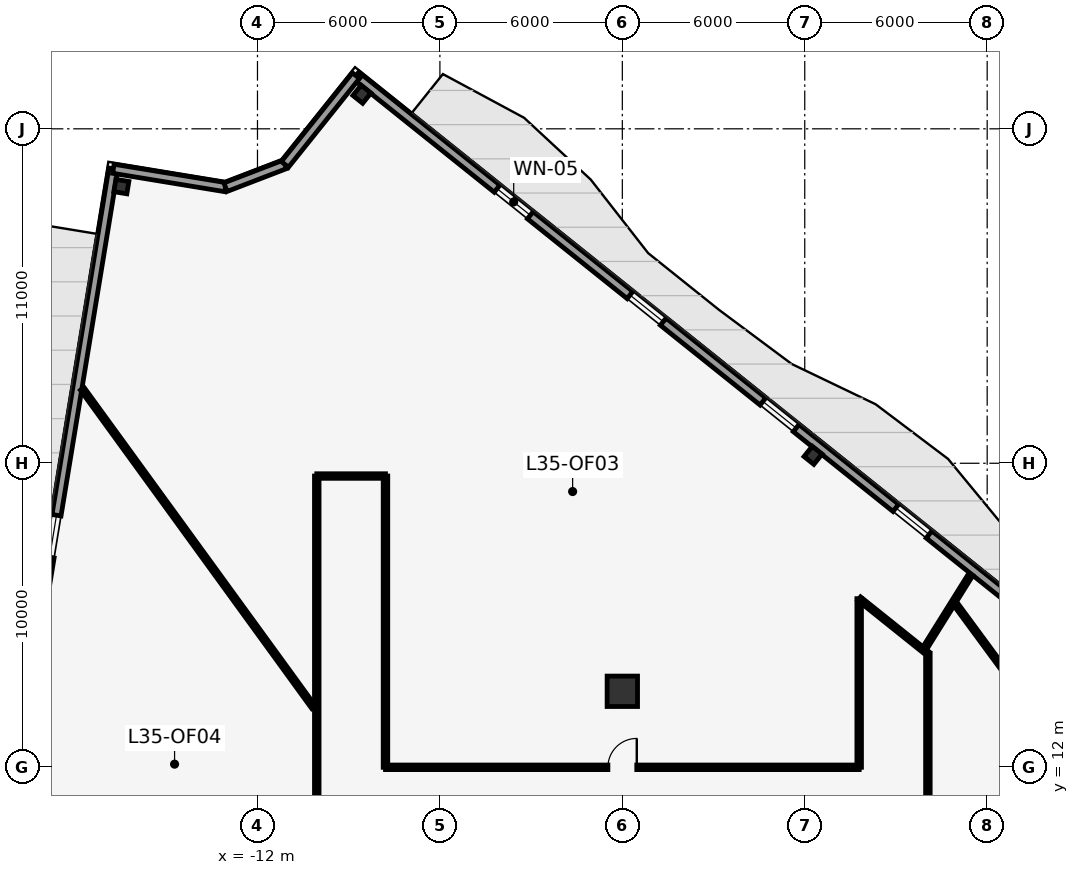
"""IFC4 building model, lengths in metres.
Left out: names, types, materials, properties, quantities, classifications, styles, units other than length and angle.
Written with IfcOpenShell. Run it as: python <this file> out.ifc"""

import sys

from ifc_helpers import new_model, si_unit, direction, frame, frame_2d, origin, origin_2d, place, context, subcontext, project, spatial, rectangle, i_section, extrude, element, fill, save


model = new_model("IFC4")
c1 = context("Model", 3, precision=1e-05, world=origin(), true_north=direction((0.0, 1.0)))
c2 = subcontext(c1, "Body", "Model", "MODEL_VIEW")
j1 = project(units=[si_unit("LENGTHUNIT", "METRE"), si_unit("PLANEANGLEUNIT", "RADIAN")], contexts=[c1])
p1 = place(None, origin())
s1 = spatial("IfcSite", under=j1, at=p1, CompositionType="ELEMENT")
p2 = place(p1, origin())
s2 = spatial("IfcBuilding", under=s1, at=p2, CompositionType="ELEMENT")
p3 = place(p2, frame((0.0, 0.0, 152.7)))
s3 = spatial("IfcBuildingStorey", under=s2, at=p3, CompositionType="ELEMENT", Elevation=152.7)
p4 = place(p3, frame((0.0, 14.5, 0.0), z_axis=(0.0, 0.0, 1.0), x_axis=(1.0, 0.0, 0.0)))
e1 = element("IfcColumn", 1, at=p4, inside=s3, PredefinedType="COLUMN", context=c2, shape_type="SweptSolid", body=[
    extrude(rectangle(XDim=1.0, YDim=1.0, at=origin_2d()), origin(), (0.0, 0.0, 1.0), 4.1),
])
for number, where, z_axis, x_axis in (
    (2, (-16.477, 31.1, 0.0), (0.0, 0.0, 1.0), (0.162, 0.987, 0.0)),
    (3, (6.273, 22.262, 0.0), (0.0, 0.0, 1.0), (-0.781, 0.625, 0.0)),
    (4, (-8.565, 34.138, 0.0), (0.0, 0.0, 1.0), (-0.781, 0.625, 0.0)),
):
    element("IfcColumn", number, at=place(p3, frame(where, z_axis=z_axis, x_axis=x_axis)), inside=s3, PredefinedType="COLUMN", context=c2, shape_type="SweptSolid", body=[
        extrude(i_section(OverallWidth=0.411, OverallDepth=0.434, WebThickness=0.036, FlangeThickness=0.057, at=origin_2d()), origin(), (0.0, 0.0, 1.0), 4.1),
    ])
p5 = place(p3, frame((-8.762, 34.748, 0.0), z_axis=(0.0, 0.0, 1.0), x_axis=(0.780669916438, -0.624943582708, 0.0)))
e5 = element("IfcWall", 5, at=p5, inside=s3, PredefinedType="STANDARD", context=c2, shape_type="SweptSolid", body=[
    extrude(rectangle(XDim=58.093, YDim=0.3, at=frame_2d((29.046, 0.0))), origin(), (0.0, 0.0, 1.0), 3.85),
])
p6 = place(p5, frame((28.547, 0.0, 0.0)))
e6 = element("IfcOpeningElement", 6, at=p6, cuts=e5, PredefinedType="OPENING", context=c2, shape_type="SweptSolid", body=[
    extrude(rectangle(XDim=1.0, YDim=2.15, at=frame_2d((0.5, 1.075))), frame((0.0, 0.16, 0.0), z_axis=(0.0, -1.0, 0.0), x_axis=(1.0, 0.0, 0.0)), (0.0, 0.0, 1.0), 0.32),
])
p7 = place(p5, frame((5.947, 0.0, 0.85)))
e7 = element("IfcOpeningElement", 7, at=p7, cuts=e5, PredefinedType="OPENING", context=c2, shape_type="SweptSolid", body=[
    extrude(rectangle(XDim=1.4, YDim=2.2, at=frame_2d((0.7, 1.1))), frame((0.0, 0.16, 0.0), z_axis=(0.0, -1.0, 0.0), x_axis=(1.0, 0.0, 0.0)), (0.0, 0.0, 1.0), 0.32),
])
p8 = place(p5, frame((11.547, 0.0, 0.85)))
e8 = element("IfcOpeningElement", 8, at=p8, cuts=e5, PredefinedType="OPENING", context=c2, shape_type="SweptSolid", body=[
    extrude(rectangle(XDim=1.4, YDim=2.2, at=frame_2d((0.7, 1.1))), frame((0.0, 0.16, 0.0), z_axis=(0.0, -1.0, 0.0), x_axis=(1.0, 0.0, 0.0)), (0.0, 0.0, 1.0), 0.32),
])
p9 = place(p5, frame((17.146, 0.0, 0.85)))
e9 = element("IfcOpeningElement", 9, at=p9, cuts=e5, PredefinedType="OPENING", context=c2, shape_type="SweptSolid", body=[
    extrude(rectangle(XDim=1.4, YDim=2.2, at=frame_2d((0.7, 1.1))), frame((0.0, 0.16, 0.0), z_axis=(0.0, -1.0, 0.0), x_axis=(1.0, 0.0, 0.0)), (0.0, 0.0, 1.0), 0.32),
])
p10 = place(p5, frame((22.747, 0.0, 0.85)))
e10 = element("IfcOpeningElement", 10, at=p10, cuts=e5, PredefinedType="OPENING", context=c2, shape_type="SweptSolid", body=[
    extrude(rectangle(XDim=1.4, YDim=2.2, at=frame_2d((0.7, 1.1))), frame((0.0, 0.16, 0.0), z_axis=(0.0, -1.0, 0.0), x_axis=(1.0, 0.0, 0.0)), (0.0, 0.0, 1.0), 0.32),
])
p11 = place(p5, frame((33.947, 0.0, 0.85)))
e11 = element("IfcOpeningElement", 11, at=p11, cuts=e5, PredefinedType="OPENING", context=c2, shape_type="SweptSolid", body=[
    extrude(rectangle(XDim=1.4, YDim=2.2, at=frame_2d((0.7, 1.1))), frame((0.0, 0.16, 0.0), z_axis=(0.0, -1.0, 0.0), x_axis=(1.0, 0.0, 0.0)), (0.0, 0.0, 1.0), 0.32),
])
p12 = place(p5, frame((39.547, 0.0, 0.85)))
e12 = element("IfcOpeningElement", 12, at=p12, cuts=e5, PredefinedType="OPENING", context=c2, shape_type="SweptSolid", body=[
    extrude(rectangle(XDim=1.4, YDim=2.2, at=frame_2d((0.7, 1.1))), frame((0.0, 0.16, 0.0), z_axis=(0.0, -1.0, 0.0), x_axis=(1.0, 0.0, 0.0)), (0.0, 0.0, 1.0), 0.32),
])
p13 = place(p5, frame((45.146, 0.0, 0.85)))
e13 = element("IfcOpeningElement", 13, at=p13, cuts=e5, PredefinedType="OPENING", context=c2, shape_type="SweptSolid", body=[
    extrude(rectangle(XDim=1.4, YDim=2.2, at=frame_2d((0.7, 1.1))), frame((0.0, 0.16, 0.0), z_axis=(0.0, -1.0, 0.0), x_axis=(1.0, 0.0, 0.0)), (0.0, 0.0, 1.0), 0.32),
])
p14 = place(p5, frame((50.747, 0.0, 0.85)))
e14 = element("IfcOpeningElement", 14, at=p14, cuts=e5, PredefinedType="OPENING", context=c2, shape_type="SweptSolid", body=[
    extrude(rectangle(XDim=1.4, YDim=2.2, at=frame_2d((0.7, 1.1))), frame((0.0, 0.16, 0.0), z_axis=(0.0, -1.0, 0.0), x_axis=(1.0, 0.0, 0.0)), (0.0, 0.0, 1.0), 0.32),
])
p15 = place(p3, frame((-26.15, -25.64, 0.0), z_axis=(0.0, 0.0, 1.0), x_axis=(0.161975761987, 0.986794736776, 0.0)))
e15 = element("IfcWall", 15, at=p15, inside=s3, PredefinedType="STANDARD", context=c2, shape_type="SweptSolid", body=[
    extrude(rectangle(XDim=58.093, YDim=0.3, at=frame_2d((29.046, 0.0))), origin(), (0.0, 0.0, 1.0), 3.85),
])
p16 = place(p15, frame((28.546, 0.0, 0.0)))
e16 = element("IfcOpeningElement", 16, at=p16, cuts=e15, PredefinedType="OPENING", context=c2, shape_type="SweptSolid", body=[
    extrude(rectangle(XDim=1.0, YDim=2.15, at=frame_2d((0.5, 1.075))), frame((0.0, 0.16, 0.0), z_axis=(0.0, -1.0, 0.0), x_axis=(1.0, 0.0, 0.0)), (0.0, 0.0, 1.0), 0.32),
])
p17 = place(p15, frame((5.947, 0.0, 0.85)))
e17 = element("IfcOpeningElement", 17, at=p17, cuts=e15, PredefinedType="OPENING", context=c2, shape_type="SweptSolid", body=[
    extrude(rectangle(XDim=1.4, YDim=2.2, at=frame_2d((0.7, 1.1))), frame((0.0, 0.16, 0.0), z_axis=(0.0, -1.0, 0.0), x_axis=(1.0, 0.0, 0.0)), (0.0, 0.0, 1.0), 0.32),
])
p18 = place(p15, frame((11.546, 0.0, 0.85)))
e18 = element("IfcOpeningElement", 18, at=p18, cuts=e15, PredefinedType="OPENING", context=c2, shape_type="SweptSolid", body=[
    extrude(rectangle(XDim=1.4, YDim=2.2, at=frame_2d((0.7, 1.1))), frame((0.0, 0.16, 0.0), z_axis=(0.0, -1.0, 0.0), x_axis=(1.0, 0.0, 0.0)), (0.0, 0.0, 1.0), 0.32),
])
p19 = place(p15, frame((22.747, 0.0, 0.85)))
e19 = element("IfcOpeningElement", 19, at=p19, cuts=e15, PredefinedType="OPENING", context=c2, shape_type="SweptSolid", body=[
    extrude(rectangle(XDim=1.4, YDim=2.2, at=frame_2d((0.7, 1.1))), frame((0.0, 0.16, 0.0), z_axis=(0.0, -1.0, 0.0), x_axis=(1.0, 0.0, 0.0)), (0.0, 0.0, 1.0), 0.32),
])
p20 = place(p15, frame((33.947, 0.0, 0.85)))
e20 = element("IfcOpeningElement", 20, at=p20, cuts=e15, PredefinedType="OPENING", context=c2, shape_type="SweptSolid", body=[
    extrude(rectangle(XDim=1.4, YDim=2.2, at=frame_2d((0.7, 1.1))), frame((0.0, 0.16, 0.0), z_axis=(0.0, -1.0, 0.0), x_axis=(1.0, 0.0, 0.0)), (0.0, 0.0, 1.0), 0.32),
])
p21 = place(p15, frame((39.546, 0.0, 0.85)))
e21 = element("IfcOpeningElement", 21, at=p21, cuts=e15, PredefinedType="OPENING", context=c2, shape_type="SweptSolid", body=[
    extrude(rectangle(XDim=1.4, YDim=2.2, at=frame_2d((0.7, 1.1))), frame((0.0, 0.16, 0.0), z_axis=(0.0, -1.0, 0.0), x_axis=(1.0, 0.0, 0.0)), (0.0, 0.0, 1.0), 0.32),
])
p22 = place(p15, frame((45.146, 0.0, 0.85)))
e22 = element("IfcOpeningElement", 22, at=p22, cuts=e15, PredefinedType="OPENING", context=c2, shape_type="SweptSolid", body=[
    extrude(rectangle(XDim=1.4, YDim=2.2, at=frame_2d((0.7, 1.1))), frame((0.0, 0.16, 0.0), z_axis=(0.0, -1.0, 0.0), x_axis=(1.0, 0.0, 0.0)), (0.0, 0.0, 1.0), 0.32),
])
p23 = place(p3, frame((-16.74, 31.686, 0.0), z_axis=(0.0, 0.0, 1.0), x_axis=(0.986793455184, -0.161983569556, 0.0)))
e23 = element("IfcWall", 23, at=p23, inside=s3, PredefinedType="STANDARD", context=c2, shape_type="SweptSolid", body=[
    extrude(rectangle(XDim=3.738, YDim=0.3, at=frame_2d((1.869, 0.0))), origin(), (0.0, 0.0, 1.0), 3.85),
])
p24 = place(p3, frame((-13.052, 31.08, 0.0), z_axis=(0.0, 0.0, 1.0), x_axis=(0.933582919313, 0.35836145547, 0.0)))
e24 = element("IfcWall", 24, at=p24, inside=s3, PredefinedType="STANDARD", context=c2, shape_type="SweptSolid", body=[
    extrude(rectangle(XDim=2.093, YDim=0.3, at=frame_2d((1.046, 0.0))), origin(), (0.0, 0.0, 1.0), 3.85),
])
p25 = place(p3, frame((-11.098, 31.83, 0.0), z_axis=(0.0, 0.0, 1.0), x_axis=(0.624949908599, 0.78066485238, 0.0)))
e25 = element("IfcWall", 25, at=p25, inside=s3, PredefinedType="STANDARD", context=c2, shape_type="SweptSolid", body=[
    extrude(rectangle(XDim=3.738, YDim=0.3, at=frame_2d((1.869, 0.0))), origin(), (0.0, 0.0, 1.0), 3.85),
])
p26 = place(p3, frame((-10.05, 0.13, 0.0), z_axis=(0.0, 0.0, 1.0), x_axis=(0.0, 1.0, 0.0)))
e26 = element("IfcWall", 26, at=p26, inside=s3, PredefinedType="PARTITIONING", context=c2, shape_type="SweptSolid", body=[
    extrude(rectangle(XDim=21.45, YDim=0.15, at=frame_2d((10.725, 0.0))), origin(), (0.0, 0.0, 1.0), 3.85),
])
p27 = place(p26, frame((6.601, 0.0, 0.0)))
e27 = element("IfcOpeningElement", 27, at=p27, cuts=e26, PredefinedType="OPENING", context=c2, shape_type="SweptSolid", body=[
    extrude(rectangle(XDim=0.95, YDim=2.15, at=frame_2d((0.475, 1.075))), frame((0.0, 0.085, 0.0), z_axis=(0.0, -1.0, 0.0), x_axis=(1.0, 0.0, 0.0)), (0.0, 0.0, 1.0), 0.17),
])
p28 = place(p3, frame((-10.05, 21.58, 0.0), z_axis=(0.0, 0.0, 1.0), x_axis=(1.0, 0.0, 0.0)))
e28 = element("IfcWall", 28, at=p28, inside=s3, PredefinedType="PARTITIONING", context=c2, shape_type="SweptSolid", body=[
    extrude(rectangle(XDim=2.26, YDim=0.15, at=frame_2d((1.13, 0.0))), origin(), (0.0, 0.0, 1.0), 3.85),
])
p29 = place(p3, frame((-7.79, 21.58, 0.0), z_axis=(0.0, 0.0, 1.0), x_axis=(0.0, -1.0, 0.0)))
e29 = element("IfcWall", 29, at=p29, inside=s3, PredefinedType="PARTITIONING", context=c2, shape_type="SweptSolid", body=[
    extrude(rectangle(XDim=9.58, YDim=0.15, at=frame_2d((4.79, 0.0))), origin(), (0.0, 0.0, 1.0), 3.85),
])
p30 = place(p3, frame((-7.79, 12.0, 0.0), z_axis=(0.0, 0.0, 1.0), x_axis=(1.0, 0.0, 0.0)))
e30 = element("IfcWall", 30, at=p30, inside=s3, PredefinedType="PARTITIONING", context=c2, shape_type="SweptSolid", body=[
    extrude(rectangle(XDim=15.58, YDim=0.15, at=frame_2d((7.79, 0.0))), origin(), (0.0, 0.0, 1.0), 3.85),
])
p31 = place(p30, frame((7.315, 0.0, 0.0)))
e31 = element("IfcOpeningElement", 31, at=p31, cuts=e30, PredefinedType="OPENING", context=c2, shape_type="SweptSolid", body=[
    extrude(rectangle(XDim=0.95, YDim=2.15, at=frame_2d((0.475, 1.075))), frame((0.0, 0.085, 0.0), z_axis=(0.0, -1.0, 0.0), x_axis=(1.0, 0.0, 0.0)), (0.0, 0.0, 1.0), 0.17),
])
p32 = place(p3, frame((7.79, 12.0, 0.0), z_axis=(0.0, 0.0, 1.0), x_axis=(0.0, 1.0, 0.0)))
e32 = element("IfcWall", 32, at=p32, inside=s3, PredefinedType="PARTITIONING", context=c2, shape_type="SweptSolid", body=[
    extrude(rectangle(XDim=5.547, YDim=0.15, at=frame_2d((2.773, 0.0))), origin(), (0.0, 0.0, 1.0), 3.85),
])
p33 = place(p3, frame((7.79, 17.547, 0.0), z_axis=(0.0, 0.0, 1.0), x_axis=(0.780646621428, -0.624972681366, 0.0)))
e33 = element("IfcWall", 33, at=p33, inside=s3, PredefinedType="PARTITIONING", context=c2, shape_type="SweptSolid", body=[
    extrude(rectangle(XDim=2.895, YDim=0.15, at=frame_2d((1.448, 0.0))), origin(), (0.0, 0.0, 1.0), 3.85),
])
p34 = place(p3, frame((10.05, 15.737, 0.0), z_axis=(0.0, 0.0, 1.0), x_axis=(0.0, -1.0, 0.0)))
e34 = element("IfcWall", 34, at=p34, inside=s3, PredefinedType="PARTITIONING", context=c2, shape_type="SweptSolid", body=[
    extrude(rectangle(XDim=15.607, YDim=0.15, at=frame_2d((7.804, 0.0))), origin(), (0.0, 0.0, 1.0), 3.85),
])
p35 = place(p34, frame((7.329, 0.0, 0.0)))
e35 = element("IfcOpeningElement", 35, at=p35, cuts=e34, PredefinedType="OPENING", context=c2, shape_type="SweptSolid", body=[
    extrude(rectangle(XDim=0.95, YDim=2.15, at=frame_2d((0.475, 1.075))), frame((0.0, 0.085, 0.0), z_axis=(0.0, -1.0, 0.0), x_axis=(1.0, 0.0, 0.0)), (0.0, 0.0, 1.0), 0.17),
])
p36 = place(p3, frame((9.962, 15.942, 0.0), z_axis=(0.0, 0.0, 1.0), x_axis=(0.529929252451, 0.848041854743, 0.0)))
e36 = element("IfcWall", 36, at=p36, inside=s3, PredefinedType="PARTITIONING", context=c2, shape_type="SweptSolid", body=[
    extrude(rectangle(XDim=2.834, YDim=0.15, at=frame_2d((1.417, 0.0))), origin(), (0.0, 0.0, 1.0), 3.85),
])
p37 = place(p3, frame((-10.155, 13.977, 0.0), z_axis=(0.0, 0.0, 1.0), x_axis=(-0.587795827483, 0.809009310944, 0.0)))
e37 = element("IfcWall", 37, at=p37, inside=s3, PredefinedType="PARTITIONING", context=c2, shape_type="SweptSolid", body=[
    extrude(rectangle(XDim=12.94, YDim=0.15, at=frame_2d((6.47, 0.0))), origin(), (0.0, 0.0, 1.0), 3.85),
])
p38 = place(p3, frame((28.13, -5.954, 0.0), z_axis=(0.0, 0.0, 1.0), x_axis=(-0.592900374234, 0.805275819973, 0.0)))
e38 = element("IfcWall", 38, at=p38, inside=s3, PredefinedType="PARTITIONING", context=c2, shape_type="SweptSolid", body=[
    extrude(rectangle(XDim=29.031, YDim=0.15, at=frame_2d((14.516, 0.0))), origin(), (0.0, 0.0, 1.0), 3.85),
])
p39 = place(p38, frame((14.066, 0.0, 0.0)))
e39 = element("IfcOpeningElement", 39, at=p39, cuts=e38, PredefinedType="OPENING", context=c2, shape_type="SweptSolid", body=[
    extrude(rectangle(XDim=0.9, YDim=2.1, at=frame_2d((0.45, 1.05))), frame((0.0, 0.085, 0.0), z_axis=(0.0, -1.0, 0.0), x_axis=(1.0, 0.0, 0.0)), (0.0, 0.0, 1.0), 0.17),
])
p40 = place(p7, origin())
e40 = element("IfcWindow", 40, at=p40, inside=s3, PartitioningType="SINGLE_PANEL", PredefinedType="WINDOW", context=c2, shape_type="SweptSolid", body=[
    extrude(rectangle(XDim=1.4, YDim=2.2, at=frame_2d((0.7, 1.1))), frame((0.0, 0.03, 0.0), z_axis=(0.0, -1.0, 0.0), x_axis=(1.0, 0.0, 0.0)), (0.0, 0.0, 1.0), 0.06),
])
fill(e7, e40)
p41 = place(p8, origin())
e41 = element("IfcWindow", 41, at=p41, inside=s3, PartitioningType="SINGLE_PANEL", PredefinedType="WINDOW", context=c2, shape_type="SweptSolid", body=[
    extrude(rectangle(XDim=1.4, YDim=2.2, at=frame_2d((0.7, 1.1))), frame((0.0, 0.03, 0.0), z_axis=(0.0, -1.0, 0.0), x_axis=(1.0, 0.0, 0.0)), (0.0, 0.0, 1.0), 0.06),
])
fill(e8, e41)
p42 = place(p9, origin())
e42 = element("IfcWindow", 42, at=p42, inside=s3, PartitioningType="SINGLE_PANEL", PredefinedType="WINDOW", context=c2, shape_type="SweptSolid", body=[
    extrude(rectangle(XDim=1.4, YDim=2.2, at=frame_2d((0.7, 1.1))), frame((0.0, 0.03, 0.0), z_axis=(0.0, -1.0, 0.0), x_axis=(1.0, 0.0, 0.0)), (0.0, 0.0, 1.0), 0.06),
])
fill(e9, e42)
p43 = place(p10, origin())
e43 = element("IfcWindow", 43, at=p43, inside=s3, PartitioningType="SINGLE_PANEL", PredefinedType="WINDOW", context=c2, shape_type="SweptSolid", body=[
    extrude(rectangle(XDim=1.4, YDim=2.2, at=frame_2d((0.7, 1.1))), frame((0.0, 0.03, 0.0), z_axis=(0.0, -1.0, 0.0), x_axis=(1.0, 0.0, 0.0)), (0.0, 0.0, 1.0), 0.06),
])
fill(e10, e43)
p44 = place(p22, origin())
e44 = element("IfcWindow", 44, at=p44, inside=s3, PartitioningType="SINGLE_PANEL", PredefinedType="WINDOW", context=c2, shape_type="SweptSolid", body=[
    extrude(rectangle(XDim=1.4, YDim=2.2, at=frame_2d((0.7, 1.1))), frame((0.0, 0.03, 0.0), z_axis=(0.0, -1.0, 0.0), x_axis=(1.0, 0.0, 0.0)), (0.0, 0.0, 1.0), 0.06),
])
fill(e22, e44)
p45 = place(p31, origin())
e45 = element("IfcDoor", 45, at=p45, inside=s3, OperationType="SINGLE_SWING_RIGHT", PredefinedType="DOOR", context=c2, shape_type="SweptSolid", body=[
    extrude(rectangle(XDim=0.95, YDim=2.15, at=frame_2d((0.475, 1.075))), frame((0.0, 0.025, 0.0), z_axis=(0.0, -1.0, 0.0), x_axis=(1.0, 0.0, 0.0)), (0.0, 0.0, 1.0), 0.05),
])
fill(e31, e45)
save(model, sys.argv[1])
